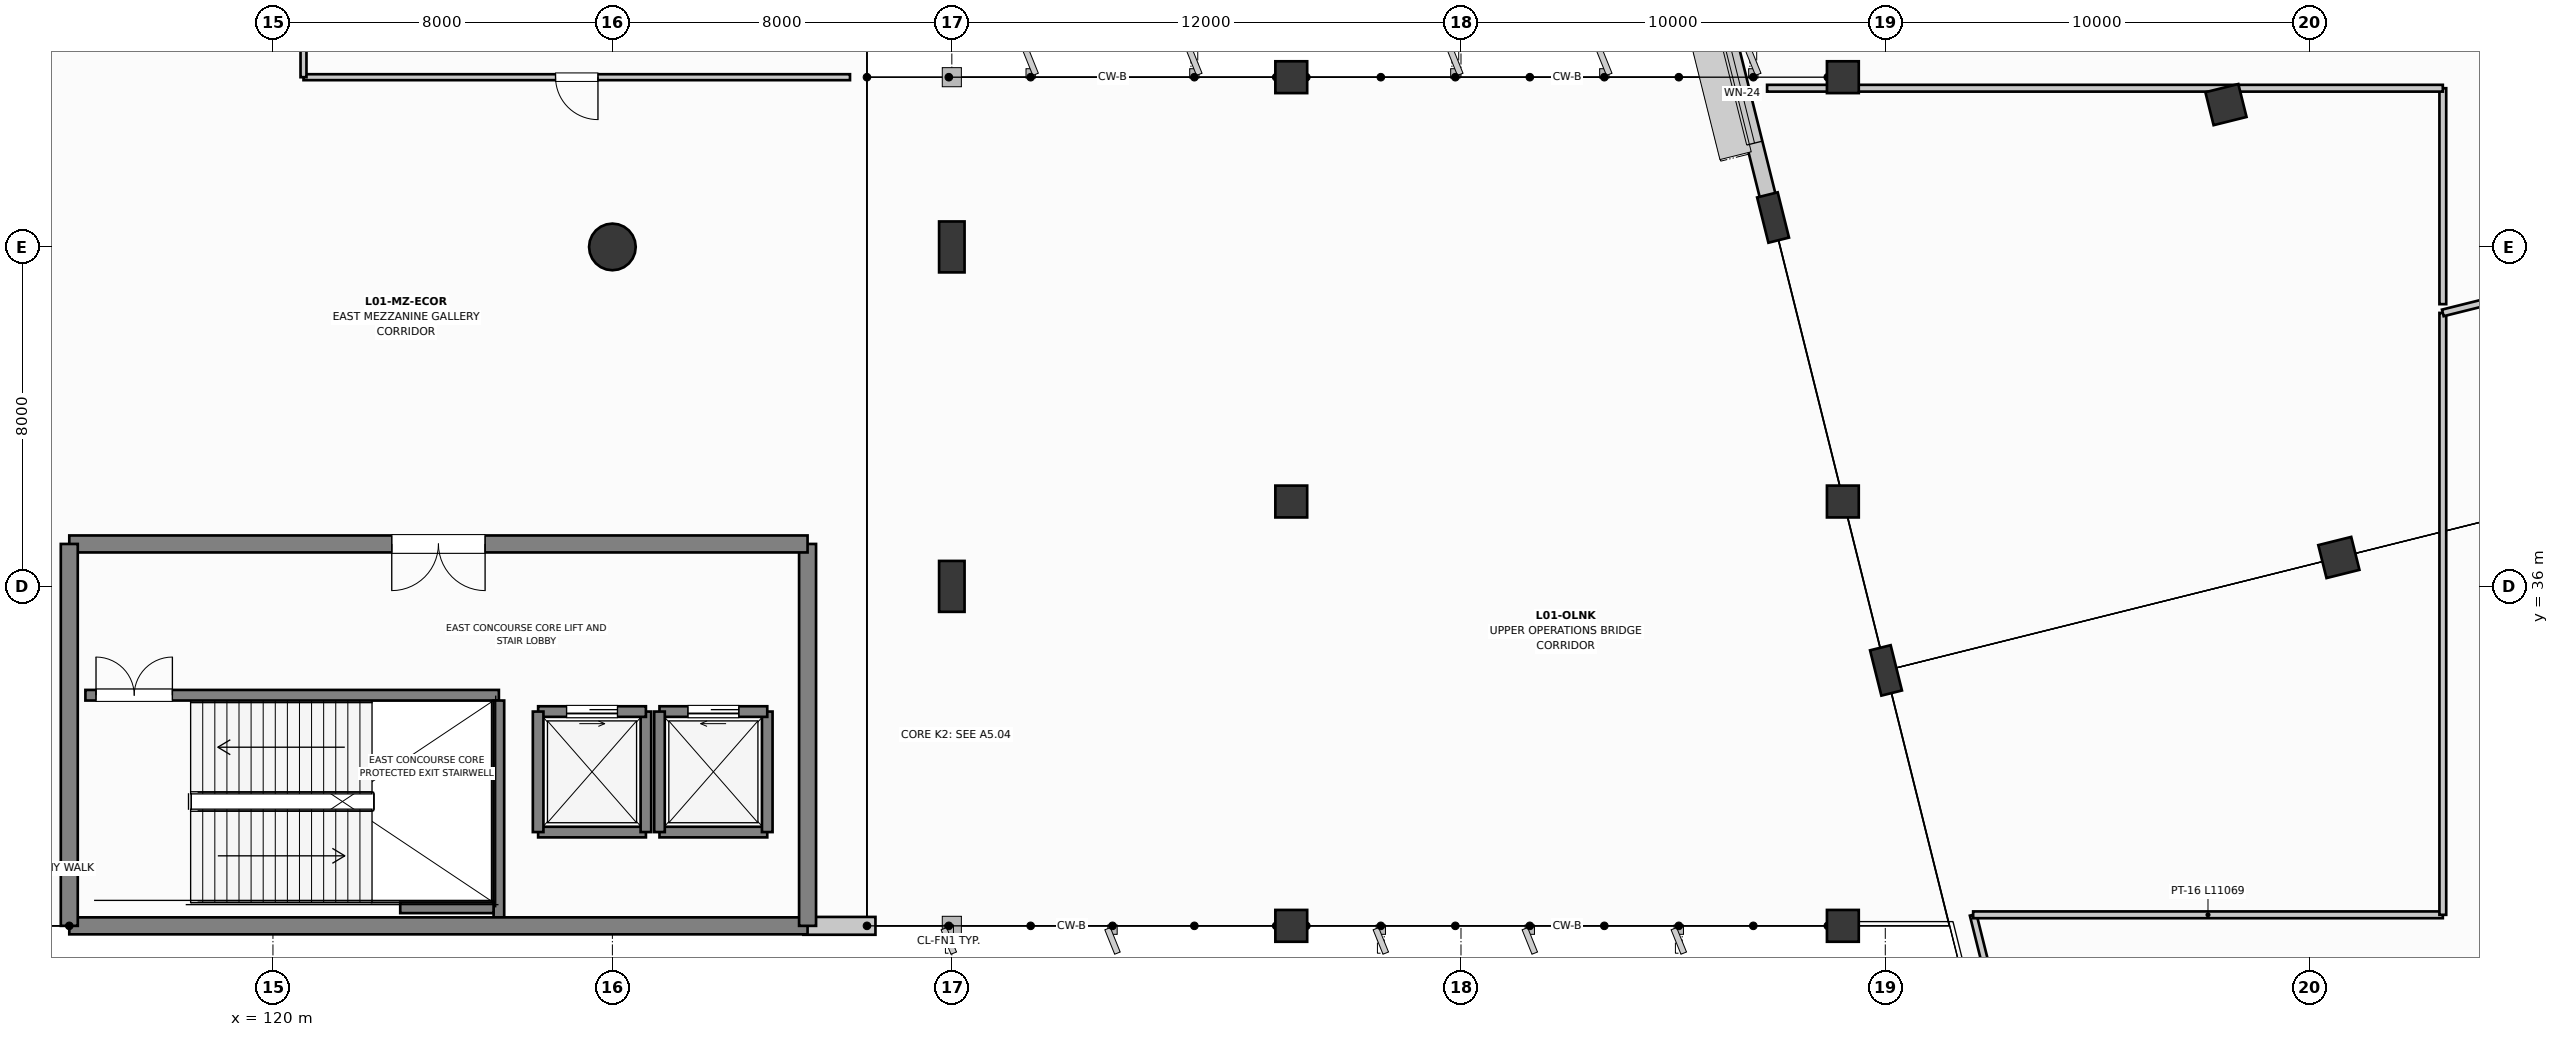
"""IFC4 building model, lengths in metres.
Left out: names, types, materials, properties, quantities, classifications, styles, units other than length and angle.
Written with IfcOpenShell. Run it as: python <this file> out.ifc"""

import sys

from ifc_helpers import new_model, si_unit, direction, frame, frame_2d, origin, origin_2d, place, context, subcontext, project, spatial, rectangle, circle, extrude, element, fill, save


model = new_model("IFC4")
c1 = context("Model", 3, precision=1e-05, world=origin(), true_north=direction((0.0, 1.0)))
c2 = subcontext(c1, "Body", "Model", "MODEL_VIEW")
j1 = project(units=[si_unit("LENGTHUNIT", "METRE"), si_unit("PLANEANGLEUNIT", "RADIAN")], contexts=[c1])
p1 = place(None, origin())
s1 = spatial("IfcSite", under=j1, at=p1, CompositionType="ELEMENT")
p2 = place(p1, origin())
s2 = spatial("IfcBuilding", under=s1, at=p2, CompositionType="ELEMENT")
p3 = place(p2, frame((0.0, 0.0, 6.0)))
s3 = spatial("IfcBuildingStorey", under=s2, at=p3, CompositionType="ELEMENT", Elevation=6.0)
p4 = place(p3, frame((128.0, 44.0, 0.0), z_axis=(0.0, 0.0, 1.0), x_axis=(1.0, 0.0, 0.0)))
e1 = element("IfcColumn", 1, at=p4, inside=s3, PredefinedType="COLUMN", context=c2, shape_type="SweptSolid", body=[
    extrude(circle(Radius=0.55, at=origin_2d()), origin(), (0.0, 0.0, 1.0), 5.4),
])
for number, where, z_axis, x_axis in (
    (2, (136.0, 36.0, 0.0), (0.0, 0.0, 1.0), (1.0, 0.0, 0.0)),
    (3, (136.0, 44.0, 0.0), (0.0, 0.0, 1.0), (1.0, 0.0, 0.0)),
):
    element("IfcColumn", number, at=place(p3, frame(where, z_axis=z_axis, x_axis=x_axis)), inside=s3, PredefinedType="COLUMN", context=c2, shape_type="SweptSolid", body=[
        extrude(rectangle(XDim=0.6, YDim=1.2, at=origin_2d()), origin(), (0.0, 0.0, 1.0), 5.4),
    ])
for number, where, z_axis, x_axis in (
    (4, (158.017, 34.02, 0.0), (0.0, 0.0, 1.0), (0.97, 0.242, 0.0)),
    (5, (155.355, 44.693, 0.0), (0.0, 0.0, 1.0), (0.97, 0.242, 0.0)),
):
    element("IfcColumn", number, at=place(p3, frame(where, z_axis=z_axis, x_axis=x_axis)), inside=s3, PredefinedType="COLUMN", context=c2, shape_type="SweptSolid", body=[
        extrude(rectangle(XDim=0.5, YDim=1.1, at=origin_2d()), origin(), (0.0, 0.0, 1.0), 5.4),
    ])
for number, where, z_axis, x_axis in (
    (6, (168.69, 36.681, 0.0), (0.0, 0.0, 1.0), (0.97, 0.242, 0.0)),
    (7, (166.029, 47.354, 0.0), (0.0, 0.0, 1.0), (0.97, 0.242, 0.0)),
):
    element("IfcColumn", number, at=place(p3, frame(where, z_axis=z_axis, x_axis=x_axis)), inside=s3, PredefinedType="COLUMN", context=c2, shape_type="SweptSolid", body=[
        extrude(rectangle(XDim=0.8, YDim=0.8, at=origin_2d()), origin(), (0.0, 0.0, 1.0), 5.4),
    ])
for number, where, z_axis, x_axis in (
    (8, (144.0, 28.0, 0.0), (0.0, 0.0, 1.0), (1.0, 0.0, 0.0)),
    (9, (144.0, 38.0, 0.0), (0.0, 0.0, 1.0), (1.0, 0.0, 0.0)),
    (10, (144.0, 48.0, 0.0), (0.0, 0.0, 1.0), (1.0, 0.0, 0.0)),
    (11, (157.0, 28.0, 0.0), (0.0, 0.0, 1.0), (1.0, 0.0, 0.0)),
    (12, (157.0, 38.0, 0.0), (0.0, 0.0, 1.0), (1.0, 0.0, 0.0)),
    (13, (157.0, 48.0, 0.0), (0.0, 0.0, 1.0), (1.0, 0.0, 0.0)),
):
    element("IfcColumn", number, at=place(p3, frame(where, z_axis=z_axis, x_axis=x_axis)), inside=s3, PredefinedType="COLUMN", context=c2, shape_type="SweptSolid", body=[
        extrude(rectangle(XDim=0.75, YDim=0.75, at=origin_2d()), origin(), (0.0, 0.0, 1.0), 5.4),
    ])
p5 = place(p3, frame((132.5, 28.0, 0.0), z_axis=(0.0, 0.0, 1.0), x_axis=(1.0, 0.0, 0.0)))
e14 = element("IfcWall", 14, at=p5, inside=s3, PredefinedType="STANDARD", context=c2, shape_type="SweptSolid", body=[
    extrude(rectangle(XDim=1.7, YDim=0.42, at=frame_2d((0.85, 0.0))), origin(), (0.0, 0.0, 1.0), 5.025),
])
p6 = place(p3, frame((152.819, 54.866, 0.0), z_axis=(0.0, 0.0, 1.0), x_axis=(0.241921955253, -0.970295711403, 0.0)))
e15 = element("IfcWall", 15, at=p6, inside=s3, PredefinedType="STANDARD", context=c2, shape_type="SweptSolid", body=[
    extrude(rectangle(XDim=9.97, YDim=0.38, at=frame_2d((4.985, 0.0))), origin(), (0.0, 0.0, 1.0), 4.055),
])
p7 = place(p6, frame((1.292, 0.0, 0.85)))
e16 = element("IfcOpeningElement", 16, at=p7, cuts=e15, PredefinedType="OPENING", context=c2, shape_type="SweptSolid", body=[
    extrude(rectangle(XDim=2.4, YDim=1.8, at=frame_2d((1.2, 0.9))), frame((0.0, 0.2, 0.0), z_axis=(0.0, -1.0, 0.0), x_axis=(1.0, 0.0, 0.0)), (0.0, 0.0, 1.0), 0.4),
])
p8 = place(p6, frame((6.277, 0.0, 0.85)))
e17 = element("IfcOpeningElement", 17, at=p8, cuts=e15, PredefinedType="OPENING", context=c2, shape_type="SweptSolid", body=[
    extrude(rectangle(XDim=2.4, YDim=1.8, at=frame_2d((1.2, 0.9))), frame((0.0, 0.2, 0.0), z_axis=(0.0, -1.0, 0.0), x_axis=(1.0, 0.0, 0.0)), (0.0, 0.0, 1.0), 0.4),
])
p9 = place(p3, frame((126.25, 30.21, 0.0), z_axis=(0.0, 0.0, 1.0), x_axis=(1.0, 0.0, 0.0)))
e18 = element("IfcWall", 18, at=p9, inside=s3, PredefinedType="SOLIDWALL", context=c2, shape_type="SweptSolid", body=[
    extrude(rectangle(XDim=2.54, YDim=0.25, at=frame_2d((1.27, 0.0))), origin(), (0.0, 0.0, 1.0), 5.05),
])
p10 = place(p3, frame((128.79, 30.21, 0.0), z_axis=(0.0, 0.0, 1.0), x_axis=(0.0, 1.0, 0.0)))
e19 = element("IfcWall", 19, at=p10, inside=s3, PredefinedType="SOLIDWALL", context=c2, shape_type="SweptSolid", body=[
    extrude(rectangle(XDim=2.84, YDim=0.25, at=frame_2d((1.42, 0.0))), origin(), (0.0, 0.0, 1.0), 5.05),
])
p11 = place(p3, frame((128.79, 33.05, 0.0), z_axis=(0.0, 0.0, 1.0), x_axis=(-1.0, 0.0, 0.0)))
e20 = element("IfcWall", 20, at=p11, inside=s3, PredefinedType="SOLIDWALL", context=c2, shape_type="SweptSolid", body=[
    extrude(rectangle(XDim=2.54, YDim=0.25, at=frame_2d((1.27, 0.0))), origin(), (0.0, 0.0, 1.0), 5.05),
])
p12 = place(p11, frame((0.67, 0.0, 0.0)))
e21 = element("IfcOpeningElement", 21, at=p12, cuts=e20, PredefinedType="OPENING", context=c2, shape_type="SweptSolid", body=[
    extrude(rectangle(XDim=1.2, YDim=2.2, at=frame_2d((0.6, 1.1))), frame((0.0, 0.135, 0.0), z_axis=(0.0, -1.0, 0.0), x_axis=(1.0, 0.0, 0.0)), (0.0, 0.0, 1.0), 0.27),
])
p13 = place(p3, frame((126.25, 33.05, 0.0), z_axis=(0.0, 0.0, 1.0), x_axis=(0.0, -1.0, 0.0)))
e22 = element("IfcWall", 22, at=p13, inside=s3, PredefinedType="SOLIDWALL", context=c2, shape_type="SweptSolid", body=[
    extrude(rectangle(XDim=2.84, YDim=0.25, at=frame_2d((1.42, 0.0))), origin(), (0.0, 0.0, 1.0), 5.05),
])
p14 = place(p3, frame((129.11, 30.21, 0.0), z_axis=(0.0, 0.0, 1.0), x_axis=(1.0, 0.0, 0.0)))
e23 = element("IfcWall", 23, at=p14, inside=s3, PredefinedType="SOLIDWALL", context=c2, shape_type="SweptSolid", body=[
    extrude(rectangle(XDim=2.54, YDim=0.25, at=frame_2d((1.27, 0.0))), origin(), (0.0, 0.0, 1.0), 5.05),
])
p15 = place(p3, frame((131.65, 30.21, 0.0), z_axis=(0.0, 0.0, 1.0), x_axis=(0.0, 1.0, 0.0)))
e24 = element("IfcWall", 24, at=p15, inside=s3, PredefinedType="SOLIDWALL", context=c2, shape_type="SweptSolid", body=[
    extrude(rectangle(XDim=2.84, YDim=0.25, at=frame_2d((1.42, 0.0))), origin(), (0.0, 0.0, 1.0), 5.05),
])
p16 = place(p3, frame((131.65, 33.05, 0.0), z_axis=(0.0, 0.0, 1.0), x_axis=(-1.0, 0.0, 0.0)))
e25 = element("IfcWall", 25, at=p16, inside=s3, PredefinedType="SOLIDWALL", context=c2, shape_type="SweptSolid", body=[
    extrude(rectangle(XDim=2.54, YDim=0.25, at=frame_2d((1.27, 0.0))), origin(), (0.0, 0.0, 1.0), 5.05),
])
p17 = place(p16, frame((0.67, 0.0, 0.0)))
e26 = element("IfcOpeningElement", 26, at=p17, cuts=e25, PredefinedType="OPENING", context=c2, shape_type="SweptSolid", body=[
    extrude(rectangle(XDim=1.2, YDim=2.2, at=frame_2d((0.6, 1.1))), frame((0.0, 0.135, 0.0), z_axis=(0.0, -1.0, 0.0), x_axis=(1.0, 0.0, 0.0)), (0.0, 0.0, 1.0), 0.27),
])
p18 = place(p3, frame((129.11, 33.05, 0.0), z_axis=(0.0, 0.0, 1.0), x_axis=(0.0, -1.0, 0.0)))
e27 = element("IfcWall", 27, at=p18, inside=s3, PredefinedType="SOLIDWALL", context=c2, shape_type="SweptSolid", body=[
    extrude(rectangle(XDim=2.84, YDim=0.25, at=frame_2d((1.42, 0.0))), origin(), (0.0, 0.0, 1.0), 5.05),
])
p19 = place(p3, frame((115.58, 33.435, 0.0), z_axis=(0.0, 0.0, 1.0), x_axis=(1.0, 0.0, 0.0)))
e28 = element("IfcWall", 28, at=p19, inside=s3, PredefinedType="SOLIDWALL", context=c2, shape_type="SweptSolid", body=[
    extrude(rectangle(XDim=9.745, YDim=0.25, at=frame_2d((4.872, 0.0))), origin(), (0.0, 0.0, 1.0), 5.02),
])
p20 = place(p19, frame((0.25, 0.0, 0.0)))
e29 = element("IfcOpeningElement", 29, at=p20, cuts=e28, PredefinedType="OPENING", context=c2, shape_type="SweptSolid", body=[
    extrude(rectangle(XDim=1.8, YDim=2.25, at=frame_2d((0.9, 1.125))), frame((0.0, 0.135, 0.0), z_axis=(0.0, -1.0, 0.0), x_axis=(1.0, 0.0, 0.0)), (0.0, 0.0, 1.0), 0.27),
])
p21 = place(p3, frame((125.325, 28.2, 0.0), z_axis=(0.0, 0.0, 1.0), x_axis=(0.0, 1.0, 0.0)))
e30 = element("IfcWall", 30, at=p21, inside=s3, PredefinedType="SOLIDWALL", context=c2, shape_type="SweptSolid", body=[
    extrude(rectangle(XDim=5.11, YDim=0.25, at=frame_2d((2.555, 0.0))), origin(), (0.0, 0.0, 1.0), 5.02),
])
p22 = place(p3, frame((123.0, 28.425, 0.0), z_axis=(0.0, 0.0, 1.0), x_axis=(1.0, 0.0, 0.0)))
e31 = element("IfcWall", 31, at=p22, inside=s3, PredefinedType="SOLIDWALL", context=c2, shape_type="SweptSolid", body=[
    extrude(rectangle(XDim=2.2, YDim=0.25, at=frame_2d((1.1, 0.0))), origin(), (0.0, 0.0, 1.0), 5.02),
])
p23 = place(p3, frame((115.2, 28.0, 0.0), z_axis=(0.0, 0.0, 1.0), x_axis=(1.0, 0.0, 0.0)))
e32 = element("IfcWall", 32, at=p23, inside=s3, PredefinedType="SHEAR", context=c2, shape_type="SweptSolid", body=[
    extrude(rectangle(XDim=17.4, YDim=0.4, at=frame_2d((8.7, 0.0))), origin(), (0.0, 0.0, 1.0), 5.05),
])
p24 = place(p3, frame((132.6, 28.0, 0.0), z_axis=(0.0, 0.0, 1.0), x_axis=(0.0, 1.0, 0.0)))
e33 = element("IfcWall", 33, at=p24, inside=s3, PredefinedType="SHEAR", context=c2, shape_type="SweptSolid", body=[
    extrude(rectangle(XDim=9.0, YDim=0.4, at=frame_2d((4.5, 0.0))), origin(), (0.0, 0.0, 1.0), 5.05),
])
p25 = place(p3, frame((132.6, 37.0, 0.0), z_axis=(0.0, 0.0, 1.0), x_axis=(-1.0, 0.0, 0.0)))
e34 = element("IfcWall", 34, at=p25, inside=s3, PredefinedType="SHEAR", context=c2, shape_type="SweptSolid", body=[
    extrude(rectangle(XDim=17.4, YDim=0.4, at=frame_2d((8.7, 0.0))), origin(), (0.0, 0.0, 1.0), 5.05),
])
p26 = place(p25, frame((7.6, 0.0, 0.0)))
e35 = element("IfcOpeningElement", 35, at=p26, cuts=e34, PredefinedType="OPENING", context=c2, shape_type="SweptSolid", body=[
    extrude(rectangle(XDim=2.2, YDim=2.3, at=frame_2d((1.1, 1.15))), frame((0.0, 0.21, 0.0), z_axis=(0.0, -1.0, 0.0), x_axis=(1.0, 0.0, 0.0)), (0.0, 0.0, 1.0), 0.42),
])
p27 = place(p3, frame((115.2, 37.0, 0.0), z_axis=(0.0, 0.0, 1.0), x_axis=(0.0, -1.0, 0.0)))
e36 = element("IfcWall", 36, at=p27, inside=s3, PredefinedType="SHEAR", context=c2, shape_type="SweptSolid", body=[
    extrude(rectangle(XDim=9.0, YDim=0.4, at=frame_2d((4.5, 0.0))), origin(), (0.0, 0.0, 1.0), 5.05),
])
p28 = place(p3, frame((133.6, 48.0, 0.0), z_axis=(0.0, 0.0, 1.0), x_axis=(-1.0, 0.0, 0.0)))
e37 = element("IfcWall", 37, at=p28, inside=s3, PredefinedType="PARTITIONING", context=c2, shape_type="SweptSolid", body=[
    extrude(rectangle(XDim=12.88, YDim=0.14, at=frame_2d((6.44, 0.0))), origin(), (0.0, 0.0, 1.0), 4.215),
])
p29 = place(p28, frame((5.94, 0.0, 0.0)))
e38 = element("IfcOpeningElement", 38, at=p29, cuts=e37, PredefinedType="OPENING", context=c2, shape_type="SweptSolid", body=[
    extrude(rectangle(XDim=1.0, YDim=2.15, at=frame_2d((0.5, 1.075))), frame((0.0, 0.08, 0.0), z_axis=(0.0, -1.0, 0.0), x_axis=(1.0, 0.0, 0.0)), (0.0, 0.0, 1.0), 0.16),
])
p30 = place(p3, frame((120.72, 48.0, 0.0), z_axis=(0.0, 0.0, 1.0), x_axis=(0.0, 1.0, 0.0)))
e39 = element("IfcWall", 39, at=p30, inside=s3, PredefinedType="PARTITIONING", context=c2, shape_type="SweptSolid", body=[
    extrude(rectangle(XDim=2.92, YDim=0.14, at=frame_2d((1.46, 0.0))), origin(), (0.0, 0.0, 1.0), 5.02),
])
p31 = place(p3, frame((162.76, 17.476, 0.0), z_axis=(0.0, 0.0, 1.0), x_axis=(-0.241921637388, 0.970295790655, 0.0)))
e40 = element("IfcWall", 40, at=p31, inside=s3, PredefinedType="PARTITIONING", context=c2, shape_type="SweptSolid", body=[
    extrude(rectangle(XDim=11.114, YDim=0.16, at=frame_2d((5.557, 0.0))), origin(), (0.0, 0.0, 1.0), 4.425),
])
p32 = place(p3, frame((160.071, 28.26, 0.0), z_axis=(0.0, 0.0, 1.0), x_axis=(1.0, 0.0, 0.0)))
e41 = element("IfcWall", 41, at=p32, inside=s3, PredefinedType="PARTITIONING", context=c2, shape_type="SweptSolid", body=[
    extrude(rectangle(XDim=11.069, YDim=0.16, at=frame_2d((5.535, 0.0))), origin(), (0.0, 0.0, 1.0), 3.975),
])
p33 = place(p3, frame((171.14, 28.26, 0.0), z_axis=(0.0, 0.0, 1.0), x_axis=(0.0, 1.0, 0.0)))
e42 = element("IfcWall", 42, at=p33, inside=s3, PredefinedType="PARTITIONING", context=c2, shape_type="SweptSolid", body=[
    extrude(rectangle(XDim=14.185, YDim=0.16, at=frame_2d((7.093, 0.0))), origin(), (0.0, 0.0, 1.0), 3.775),
])
p34 = place(p3, frame((171.14, 42.445, 0.0), z_axis=(0.0, 0.0, 1.0), x_axis=(0.970296620791, 0.241918307867, 0.0)))
e43 = element("IfcWall", 43, at=p34, inside=s3, PredefinedType="PARTITIONING", context=c2, shape_type="SweptSolid", body=[
    extrude(rectangle(XDim=14.828, YDim=0.16, at=frame_2d((7.414, 0.0))), origin(), (0.0, 0.0, 1.0), 3.835),
])
p35 = place(p3, frame((171.14, 42.651, 0.0), z_axis=(0.0, 0.0, 1.0), x_axis=(0.0, 1.0, 0.0)))
e44 = element("IfcWall", 44, at=p35, inside=s3, PredefinedType="PARTITIONING", context=c2, shape_type="SweptSolid", body=[
    extrude(rectangle(XDim=5.089, YDim=0.16, at=frame_2d((2.545, 0.0))), origin(), (0.0, 0.0, 1.0), 4.535),
])
p36 = place(p3, frame((171.14, 47.74, 0.0), z_axis=(0.0, 0.0, 1.0), x_axis=(-1.0, 0.0, 0.0)))
e45 = element("IfcWall", 45, at=p36, inside=s3, PredefinedType="PARTITIONING", context=c2, shape_type="SweptSolid", body=[
    extrude(rectangle(XDim=15.926, YDim=0.16, at=frame_2d((7.963, 0.0))), origin(), (0.0, 0.0, 1.0), 3.855),
])
p37 = place(p8, origin())
e46 = element("IfcWindow", 46, at=p37, inside=s3, PartitioningType="SINGLE_PANEL", PredefinedType="WINDOW", context=c2, shape_type="SweptSolid", body=[
    extrude(rectangle(XDim=2.4, YDim=1.8, at=frame_2d((1.2, 0.9))), frame((0.0, 0.03, 0.0), z_axis=(0.0, -1.0, 0.0), x_axis=(1.0, 0.0, 0.0)), (0.0, 0.0, 1.0), 0.06),
])
fill(e17, e46)
p38 = place(p12, origin())
e47 = element("IfcDoor", 47, at=p38, inside=s3, OperationType="SLIDING_TO_LEFT", PredefinedType="DOOR", context=c2, shape_type="SweptSolid", body=[
    extrude(rectangle(XDim=1.2, YDim=2.2, at=frame_2d((0.6, 1.1))), frame((0.0, 0.025, 0.0), z_axis=(0.0, -1.0, 0.0), x_axis=(1.0, 0.0, 0.0)), (0.0, 0.0, 1.0), 0.05),
])
fill(e21, e47)
p39 = place(p17, origin())
e48 = element("IfcDoor", 48, at=p39, inside=s3, OperationType="SLIDING_TO_RIGHT", PredefinedType="DOOR", context=c2, shape_type="SweptSolid", body=[
    extrude(rectangle(XDim=1.2, YDim=2.2, at=frame_2d((0.6, 1.1))), frame((0.0, 0.025, 0.0), z_axis=(0.0, -1.0, 0.0), x_axis=(1.0, 0.0, 0.0)), (0.0, 0.0, 1.0), 0.05),
])
fill(e26, e48)
p40 = place(p20, origin())
e49 = element("IfcDoor", 49, at=p40, inside=s3, OperationType="DOUBLE_DOOR_SINGLE_SWING", PredefinedType="DOOR", context=c2, shape_type="SweptSolid", body=[
    extrude(rectangle(XDim=1.8, YDim=2.25, at=frame_2d((0.9, 1.125))), frame((0.0, 0.025, 0.0), z_axis=(0.0, -1.0, 0.0), x_axis=(1.0, 0.0, 0.0)), (0.0, 0.0, 1.0), 0.05),
])
fill(e29, e49)
p41 = place(p26, origin())
e50 = element("IfcDoor", 50, at=p41, inside=s3, OperationType="DOUBLE_DOOR_SINGLE_SWING", PredefinedType="DOOR", context=c2, shape_type="SweptSolid", body=[
    extrude(rectangle(XDim=2.2, YDim=2.3, at=frame_2d((1.1, 1.15))), frame((0.0, 0.025, 0.0), z_axis=(0.0, -1.0, 0.0), x_axis=(1.0, 0.0, 0.0)), (0.0, 0.0, 1.0), 0.05),
])
fill(e35, e50)
p42 = place(p29, origin())
e51 = element("IfcDoor", 51, at=p42, inside=s3, OperationType="SINGLE_SWING_LEFT", PredefinedType="DOOR", context=c2, shape_type="SweptSolid", body=[
    extrude(rectangle(XDim=1.0, YDim=2.15, at=frame_2d((0.5, 1.075))), frame((0.0, 0.025, 0.0), z_axis=(0.0, -1.0, 0.0), x_axis=(1.0, 0.0, 0.0)), (0.0, 0.0, 1.0), 0.05),
])
fill(e38, e51)
save(model, sys.argv[1])
